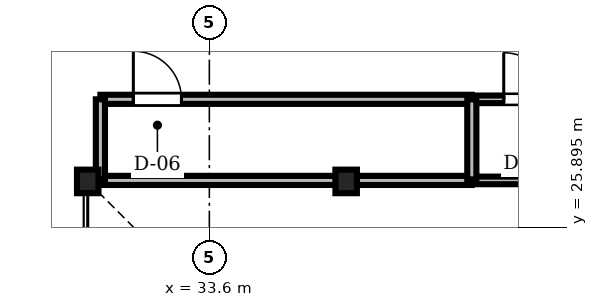
"""IFC4 building model, lengths in metres.
Left out: names, types, materials, properties, quantities, classifications, styles, units other than length and angle.
Written with IfcOpenShell. Run it as: python <this file> out.ifc"""

import sys

from ifc_helpers import new_model, si_unit, direction, frame, frame_2d, origin, origin_2d, place, context, subcontext, project, spatial, rectangle, i_section, extrude, source, transform, mapped, element, fill, save


model = new_model("IFC4")
c1 = context("Model", 3, precision=1e-05, world=origin(), true_north=direction((0.0, 1.0)))
c2 = subcontext(c1, "Body", "Model", "MODEL_VIEW")
j1 = project(units=[si_unit("LENGTHUNIT", "METRE"), si_unit("PLANEANGLEUNIT", "RADIAN")], contexts=[c1])
p1 = place(None, origin())
s1 = spatial("IfcSite", under=j1, at=p1, CompositionType="ELEMENT")
p2 = place(p1, origin())
s2 = spatial("IfcBuilding", under=s1, at=p2, CompositionType="ELEMENT")
p3 = place(p2, frame((0.0, 0.0, 118.7)))
s3 = spatial("IfcBuildingStorey", under=s2, at=p3, CompositionType="ELEMENT", Elevation=118.7)
m1 = source(origin(), c2, "Body", "SweptSolid", [
    extrude(i_section(OverallWidth=0.424, OverallDepth=0.465, WebThickness=0.035, FlangeThickness=0.056, FilletRadius=0.015, at=origin_2d()), origin(), (0.0, 0.0, 1.0), 3.46),
])
for number, where, z_axis, x_axis in (
    (1, (36.3, 26.8, 0.0), (0.0, 0.0, 1.0), (1.0, 0.0, 0.0)),
    (2, (31.2, 26.8, 0.0), (0.0, 0.0, 1.0), (1.0, 0.0, 0.0)),
):
    element("IfcColumn", number, at=place(p3, frame(where, z_axis=z_axis, x_axis=x_axis)), inside=s3, PredefinedType="COLUMN", context=c2, shape_type="MappedRepresentation", body=[
        mapped(m1, transform((0.0, 0.0, 0.0), scale=1.0)),
    ])
m2 = source(origin(), c2, "Body", "SweptSolid", [
    extrude(rectangle(XDim=7.33, YDim=0.18, at=frame_2d((3.665, 0.0))), origin(), (0.0, 0.0, 1.0), 3.092),
])
p4 = place(p3, frame((31.45, 28.42, 0.0), z_axis=(0.0, 0.0, 1.0), x_axis=(1.0, 0.0, 0.0)))
e3 = element("IfcWall", 3, at=p4, inside=s3, PredefinedType="PARTITIONING", context=c2, shape_type="MappedRepresentation", body=[
    mapped(m2, transform((0.0, 0.0, 0.0), scale=1.0)),
])
m3 = source(origin(), c2, "Body", "SweptSolid", [
    extrude(rectangle(XDim=0.95, YDim=2.15, at=frame_2d((0.475, 1.075))), frame((0.0, 0.1, 0.0), z_axis=(0.0, -1.0, 0.0), x_axis=(1.0, 0.0, 0.0)), (0.0, 0.0, 1.0), 0.2),
])
p5 = place(p4, frame((0.65, 0.0, 0.0)))
e4 = element("IfcOpeningElement", 4, at=p5, cuts=e3, PredefinedType="OPENING", context=c2, shape_type="MappedRepresentation", body=[
    mapped(m3, transform((0.0, 0.0, 0.0), scale=1.0)),
])
m4 = source(origin(), c2, "Body", "SweptSolid", [
    extrude(rectangle(XDim=2.74, YDim=0.15, at=frame_2d((1.37, 0.0))), origin(), (0.0, 0.0, 1.0), 3.46),
])
p6 = place(p3, frame((38.78, 28.42, 0.0), z_axis=(0.0, 0.0, 1.0), x_axis=(1.0, 0.0, 0.0)))
e5 = element("IfcWall", 5, at=p6, inside=s3, PredefinedType="PARTITIONING", context=c2, shape_type="MappedRepresentation", body=[
    mapped(m4, transform((0.0, 0.0, 0.0), scale=1.0)),
])
m5 = source(origin(), c2, "Body", "SweptSolid", [
    extrude(rectangle(XDim=0.92, YDim=2.1, at=frame_2d((0.46, 1.05))), frame((0.0, 0.085, 0.0), z_axis=(0.0, -1.0, 0.0), x_axis=(1.0, 0.0, 0.0)), (0.0, 0.0, 1.0), 0.17),
])
p7 = place(p6, frame((0.63, 0.0, 0.0)))
e6 = element("IfcOpeningElement", 6, at=p7, cuts=e5, PredefinedType="OPENING", context=c2, shape_type="MappedRepresentation", body=[
    mapped(m5, transform((0.0, 0.0, 0.0), scale=1.0)),
])
m6 = source(origin(), c2, "Body", "SweptSolid", [
    extrude(rectangle(XDim=7.33, YDim=0.18, at=frame_2d((3.665, 0.0))), origin(), (0.0, 0.0, 1.0), 3.002),
])
p8 = place(p3, frame((31.45, 26.82, 0.0), z_axis=(0.0, 0.0, 1.0), x_axis=(1.0, 0.0, 0.0)))
e7 = element("IfcWall", 7, at=p8, inside=s3, PredefinedType="PARTITIONING", context=c2, shape_type="MappedRepresentation", body=[
    mapped(m6, transform((0.0, 0.0, 0.0), scale=1.0)),
])
m7 = source(origin(), c2, "Body", "SweptSolid", [
    extrude(rectangle(XDim=2.74, YDim=0.15, at=frame_2d((1.37, 0.0))), origin(), (0.0, 0.0, 1.0), 2.852),
])
p9 = place(p3, frame((38.78, 26.82, 0.0), z_axis=(0.0, 0.0, 1.0), x_axis=(1.0, 0.0, 0.0)))
e8 = element("IfcWall", 8, at=p9, inside=s3, PredefinedType="PARTITIONING", context=c2, shape_type="MappedRepresentation", body=[
    mapped(m7, transform((0.0, 0.0, 0.0), scale=1.0)),
])
m8 = source(origin(), c2, "Body", "SweptSolid", [
    extrude(rectangle(XDim=1.6, YDim=0.18, at=frame_2d((0.8, 0.0))), origin(), (0.0, 0.0, 1.0), 3.002),
])
for number, where, z_axis, x_axis in (
    (9, (31.45, 26.82, 0.0), (0.0, 0.0, 1.0), (0.0, 1.0, 0.0)),
    (10, (38.78, 26.82, 0.0), (0.0, 0.0, 1.0), (0.0, 1.0, 0.0)),
):
    element("IfcWall", number, at=place(p3, frame(where, z_axis=z_axis, x_axis=x_axis)), inside=s3, PredefinedType="PARTITIONING", context=c2, shape_type="MappedRepresentation", body=[
        mapped(m8, transform((0.0, 0.0, 0.0), scale=1.0)),
    ])
m9 = source(origin(), c2, "Body", "SweptSolid", [
    extrude(rectangle(XDim=0.95, YDim=2.15, at=frame_2d((0.475, 1.075))), frame((0.0, 0.025, 0.0), z_axis=(0.0, -1.0, 0.0), x_axis=(1.0, 0.0, 0.0)), (0.0, 0.0, 1.0), 0.05),
])
p10 = place(p5, origin())
e11 = element("IfcDoor", 11, at=p10, inside=s3, OperationType="SINGLE_SWING_LEFT", PredefinedType="DOOR", context=c2, shape_type="MappedRepresentation", body=[
    mapped(m9, transform((0.0, 0.0, 0.0), scale=1.0)),
])
fill(e4, e11)
m10 = source(origin(), c2, "Body", "SweptSolid", [
    extrude(rectangle(XDim=0.92, YDim=2.1, at=frame_2d((0.46, 1.05))), frame((0.0, 0.025, 0.0), z_axis=(0.0, -1.0, 0.0), x_axis=(1.0, 0.0, 0.0)), (0.0, 0.0, 1.0), 0.05),
])
p11 = place(p7, origin())
e12 = element("IfcDoor", 12, at=p11, inside=s3, OperationType="SINGLE_SWING_LEFT", PredefinedType="DOOR", context=c2, shape_type="MappedRepresentation", body=[
    mapped(m10, transform((0.0, 0.0, 0.0), scale=1.0)),
])
fill(e6, e12)
save(model, sys.argv[1])
